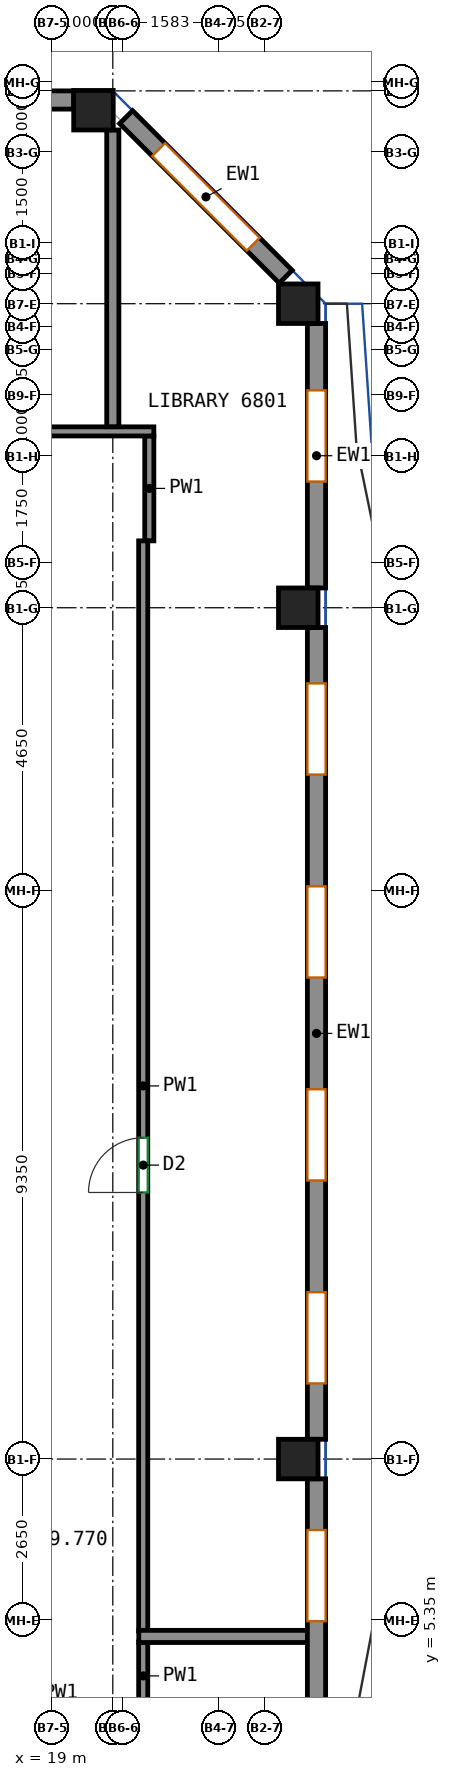
"""IFC4 building model, lengths in metres.
Left out: names, types, materials, properties, quantities, classifications, styles, units other than length and angle.
Written with IfcOpenShell. Run it as: python <this file> out.ifc"""

import sys

from ifc_helpers import new_model, si_unit, direction, frame, frame_2d, origin, origin_2d, place, context, subcontext, project, spatial, rectangle, extrude, source, transform, mapped, element, fill, save


model = new_model("IFC4")
c1 = context("Model", 3, precision=1e-05, world=origin(), true_north=direction((0.0, 1.0)))
c2 = subcontext(c1, "Body", "Model", "MODEL_VIEW")
j1 = project(units=[si_unit("LENGTHUNIT", "METRE"), si_unit("PLANEANGLEUNIT", "RADIAN")], contexts=[c1])
p1 = place(None, origin())
s1 = spatial("IfcSite", under=j1, at=p1, CompositionType="ELEMENT")
p2 = place(p1, origin())
s2 = spatial("IfcBuilding", under=s1, at=p2, CompositionType="ELEMENT")
p3 = place(p2, frame((0.0, 0.0, 277.2)))
s3 = spatial("IfcBuildingStorey", under=s2, at=p3, CompositionType="ELEMENT", Elevation=277.2)
m1 = source(origin(), c2, "Body", "SweptSolid", [
    extrude(rectangle(XDim=0.65, YDim=0.65, at=origin_2d()), origin(), (0.0, 0.0, 1.0), 3.12),
])
for number, where, z_axis, x_axis in (
    (1, (19.682, 30.182, 0.0), (0.0, 0.0, 1.0), (1.0, 0.0, 0.0)),
    (2, (23.05, 8.0, 0.0), (0.0, 0.0, 1.0), (1.0, 0.0, 0.0)),
    (3, (23.05, 22.0, 0.0), (0.0, 0.0, 1.0), (1.0, 0.0, 0.0)),
    (4, (23.05, 27.0, 0.0), (0.0, 0.0, 1.0), (1.0, 0.0, 0.0)),
):
    element("IfcColumn", number, at=place(p3, frame(where, z_axis=z_axis, x_axis=x_axis)), inside=s3, PredefinedType="COLUMN", context=c2, shape_type="MappedRepresentation", body=[
        mapped(m1, transform((0.0, 0.0, 0.0))),
    ])
m2 = source(origin(), c2, "Body", "SweptSolid", [
    extrude(rectangle(XDim=8.183, YDim=0.3, at=frame_2d((4.092, 0.0))), origin(), (0.0, 0.0, 1.0), 3.12),
])
p4 = place(p3, frame((23.35, -0.508, 0.0), z_axis=(0.0, 0.0, 1.0), x_axis=(0.0, 1.0, 0.0)))
e5 = element("IfcWall", 5, at=p4, inside=s3, PredefinedType="SOLIDWALL", context=c2, shape_type="MappedRepresentation", body=[
    mapped(m2, transform((0.0, 0.0, 0.0))),
])
p5 = place(p4, frame((1.75, 0.0, 0.8)))
e6 = element("IfcOpeningElement", 6, at=p5, cuts=e5, PredefinedType="OPENING", context=c2, shape_type="SweptSolid", body=[
    extrude(rectangle(XDim=1.5, YDim=2.05, at=frame_2d((0.75, 1.025))), frame((0.0, 0.16, 0.0), z_axis=(0.0, -1.0, 0.0), x_axis=(1.0, 0.0, 0.0)), (0.0, 0.0, 1.0), 0.32),
])
p6 = place(p4, frame((5.842, 0.0, 0.8)))
e7 = element("IfcOpeningElement", 7, at=p6, cuts=e5, PredefinedType="OPENING", context=c2, shape_type="SweptSolid", body=[
    extrude(rectangle(XDim=1.5, YDim=2.05, at=frame_2d((0.75, 1.025))), frame((0.0, 0.16, 0.0), z_axis=(0.0, -1.0, 0.0), x_axis=(1.0, 0.0, 0.0)), (0.0, 0.0, 1.0), 0.32),
])
m3 = source(origin(), c2, "Body", "SweptSolid", [
    extrude(rectangle(XDim=13.35, YDim=0.3, at=frame_2d((6.675, 0.0))), origin(), (0.0, 0.0, 1.0), 3.12),
])
p7 = place(p3, frame((23.35, 8.325, 0.0), z_axis=(0.0, 0.0, 1.0), x_axis=(0.0, 1.0, 0.0)))
e8 = element("IfcWall", 8, at=p7, inside=s3, PredefinedType="SOLIDWALL", context=c2, shape_type="MappedRepresentation", body=[
    mapped(m3, transform((0.0, 0.0, 0.0))),
])
p8 = place(p7, frame((0.919, 0.0, 0.8)))
e9 = element("IfcOpeningElement", 9, at=p8, cuts=e8, PredefinedType="OPENING", context=c2, shape_type="SweptSolid", body=[
    extrude(rectangle(XDim=1.5, YDim=2.05, at=frame_2d((0.75, 1.025))), frame((0.0, 0.16, 0.0), z_axis=(0.0, -1.0, 0.0), x_axis=(1.0, 0.0, 0.0)), (0.0, 0.0, 1.0), 0.32),
])
p9 = place(p7, frame((4.256, 0.0, 0.8)))
e10 = element("IfcOpeningElement", 10, at=p9, cuts=e8, PredefinedType="OPENING", context=c2, shape_type="SweptSolid", body=[
    extrude(rectangle(XDim=1.5, YDim=2.05, at=frame_2d((0.75, 1.025))), frame((0.0, 0.16, 0.0), z_axis=(0.0, -1.0, 0.0), x_axis=(1.0, 0.0, 0.0)), (0.0, 0.0, 1.0), 0.32),
])
p10 = place(p7, frame((7.594, 0.0, 0.8)))
e11 = element("IfcOpeningElement", 11, at=p10, cuts=e8, PredefinedType="OPENING", context=c2, shape_type="SweptSolid", body=[
    extrude(rectangle(XDim=1.5, YDim=2.05, at=frame_2d((0.75, 1.025))), frame((0.0, 0.16, 0.0), z_axis=(0.0, -1.0, 0.0), x_axis=(1.0, 0.0, 0.0)), (0.0, 0.0, 1.0), 0.32),
])
p11 = place(p7, frame((10.931, 0.0, 0.8)))
e12 = element("IfcOpeningElement", 12, at=p11, cuts=e8, PredefinedType="OPENING", context=c2, shape_type="SweptSolid", body=[
    extrude(rectangle(XDim=1.5, YDim=2.05, at=frame_2d((0.75, 1.025))), frame((0.0, 0.16, 0.0), z_axis=(0.0, -1.0, 0.0), x_axis=(1.0, 0.0, 0.0)), (0.0, 0.0, 1.0), 0.32),
])
m4 = source(origin(), c2, "Body", "SweptSolid", [
    extrude(rectangle(XDim=4.35, YDim=0.3, at=frame_2d((2.175, 0.0))), origin(), (0.0, 0.0, 1.0), 3.12),
])
p12 = place(p3, frame((23.35, 22.325, 0.0), z_axis=(0.0, 0.0, 1.0), x_axis=(0.0, 1.0, 0.0)))
e13 = element("IfcWall", 13, at=p12, inside=s3, PredefinedType="SOLIDWALL", context=c2, shape_type="MappedRepresentation", body=[
    mapped(m4, transform((0.0, 0.0, 0.0))),
])
p13 = place(p12, frame((1.75, 0.0, 0.8)))
e14 = element("IfcOpeningElement", 14, at=p13, cuts=e13, PredefinedType="OPENING", context=c2, shape_type="SweptSolid", body=[
    extrude(rectangle(XDim=1.5, YDim=2.05, at=frame_2d((0.75, 1.025))), frame((0.0, 0.16, 0.0), z_axis=(0.0, -1.0, 0.0), x_axis=(1.0, 0.0, 0.0)), (0.0, 0.0, 1.0), 0.32),
])
m5 = source(origin(), c2, "Body", "SweptSolid", [
    extrude(rectangle(XDim=3.712, YDim=0.3, at=frame_2d((1.856, 0.0))), origin(), (0.0, 0.0, 1.0), 3.12),
])
p14 = place(p3, frame((22.844, 27.444, 0.0), z_axis=(0.0, 0.0, 1.0), x_axis=(-0.707106781187, 0.707106781187, 0.0)))
e15 = element("IfcWall", 15, at=p14, inside=s3, PredefinedType="SOLIDWALL", context=c2, shape_type="MappedRepresentation", body=[
    mapped(m5, transform((0.0, 0.0, 0.0))),
])
p15 = place(p14, frame((0.756, 0.0, 0.8)))
e16 = element("IfcOpeningElement", 16, at=p15, cuts=e15, PredefinedType="OPENING", context=c2, shape_type="SweptSolid", body=[
    extrude(rectangle(XDim=2.2, YDim=2.05, at=frame_2d((1.1, 1.025))), frame((0.0, 0.16, 0.0), z_axis=(0.0, -1.0, 0.0), x_axis=(1.0, 0.0, 0.0)), (0.0, 0.0, 1.0), 0.32),
])
m6 = source(origin(), c2, "Body", "SweptSolid", [
    extrude(rectangle(XDim=6.032, YDim=0.3, at=frame_2d((3.016, 0.0))), origin(), (0.0, 0.0, 1.0), 3.12),
])
p16 = place(p3, frame((19.357, 30.35, 0.0), z_axis=(0.0, 0.0, 1.0), x_axis=(-1.0, 0.0, 0.0)))
e17 = element("IfcWall", 17, at=p16, inside=s3, PredefinedType="SOLIDWALL", context=c2, shape_type="MappedRepresentation", body=[
    mapped(m6, transform((0.0, 0.0, 0.0))),
])
p17 = place(p16, frame((0.408, 0.0, 0.8)))
e18 = element("IfcOpeningElement", 18, at=p17, cuts=e17, PredefinedType="OPENING", context=c2, shape_type="SweptSolid", body=[
    extrude(rectangle(XDim=2.2, YDim=2.05, at=frame_2d((1.1, 1.025))), frame((0.0, 0.16, 0.0), z_axis=(0.0, -1.0, 0.0), x_axis=(1.0, 0.0, 0.0)), (0.0, 0.0, 1.0), 0.32),
])
p18 = place(p16, frame((3.424, 0.0, 0.8)))
e19 = element("IfcOpeningElement", 19, at=p18, cuts=e17, PredefinedType="OPENING", context=c2, shape_type="SweptSolid", body=[
    extrude(rectangle(XDim=2.2, YDim=2.05, at=frame_2d((1.1, 1.025))), frame((0.0, 0.16, 0.0), z_axis=(0.0, -1.0, 0.0), x_axis=(1.0, 0.0, 0.0)), (0.0, 0.0, 1.0), 0.32),
])
p19 = place(p3, frame((20.5, 3.875, 0.0), z_axis=(0.0, 0.0, 1.0), x_axis=(0.0, 1.0, 0.0)))
e20 = element("IfcWall", 20, at=p19, inside=s3, PredefinedType="PARTITIONING", context=c2, shape_type="SweptSolid", body=[
    extrude(rectangle(XDim=1.118, YDim=0.15, at=frame_2d((0.559, 0.0))), origin(), (0.0, 0.0, 1.0), 3.12),
])
p20 = place(p3, frame((20.6, 23.1, 0.0), z_axis=(0.0, 0.0, 1.0), x_axis=(0.0, 1.0, 0.0)))
e21 = element("IfcWall", 21, at=p20, inside=s3, PredefinedType="PARTITIONING", context=c2, shape_type="SweptSolid", body=[
    extrude(rectangle(XDim=1.725, YDim=0.15, at=frame_2d((0.862, 0.0))), origin(), (0.0, 0.0, 1.0), 3.12),
])
p21 = place(p3, frame((20.5, 5.173, 0.0), z_axis=(0.0, 0.0, 1.0), x_axis=(0.0, 1.0, 0.0)))
e22 = element("IfcWall", 22, at=p21, inside=s3, PredefinedType="PARTITIONING", context=c2, shape_type="SweptSolid", body=[
    extrude(rectangle(XDim=17.927, YDim=0.15, at=frame_2d((8.963, 0.0))), origin(), (0.0, 0.0, 1.0), 3.12),
])
p22 = place(p21, frame((7.211, 0.0, 0.0)))
e23 = element("IfcOpeningElement", 23, at=p22, cuts=e22, PredefinedType="OPENING", context=c2, shape_type="SweptSolid", body=[
    extrude(rectangle(XDim=0.9, YDim=2.1, at=frame_2d((0.45, 1.05))), frame((0.0, 0.085, 0.0), z_axis=(0.0, -1.0, 0.0), x_axis=(1.0, 0.0, 0.0)), (0.0, 0.0, 1.0), 0.17),
])
p23 = place(p3, frame((-19.075, 24.9, 0.0), z_axis=(0.0, 0.0, 1.0), x_axis=(1.0, 0.0, 0.0)))
e24 = element("IfcWall", 24, at=p23, inside=s3, PredefinedType="PARTITIONING", context=c2, shape_type="SweptSolid", body=[
    extrude(rectangle(XDim=39.75, YDim=0.15, at=frame_2d((19.875, 0.0))), origin(), (0.0, 0.0, 1.0), 3.12),
])
p24 = place(p23, frame((11.365, 0.0, 0.0)))
e25 = element("IfcOpeningElement", 25, at=p24, cuts=e24, PredefinedType="OPENING", context=c2, shape_type="SweptSolid", body=[
    extrude(rectangle(XDim=1.0, YDim=2.1, at=frame_2d((0.5, 1.05))), frame((0.0, 0.085, 0.0), z_axis=(0.0, -1.0, 0.0), x_axis=(1.0, 0.0, 0.0)), (0.0, 0.0, 1.0), 0.17),
])
p25 = place(p23, frame((33.379, 0.0, 0.0)))
e26 = element("IfcOpeningElement", 26, at=p25, cuts=e24, PredefinedType="OPENING", context=c2, shape_type="SweptSolid", body=[
    extrude(rectangle(XDim=0.9, YDim=2.1, at=frame_2d((0.45, 1.05))), frame((0.0, 0.085, 0.0), z_axis=(0.0, -1.0, 0.0), x_axis=(1.0, 0.0, 0.0)), (0.0, 0.0, 1.0), 0.17),
])
p26 = place(p3, frame((23.25, 5.083, 0.0), z_axis=(0.0, 0.0, 1.0), x_axis=(-1.0, 0.0, 0.0)))
e27 = element("IfcWall", 27, at=p26, inside=s3, PredefinedType="PARTITIONING", context=c2, shape_type="SweptSolid", body=[
    extrude(rectangle(XDim=2.823, YDim=0.2, at=frame_2d((1.412, 0.0))), origin(), (0.0, 0.0, 1.0), 3.12),
])
p27 = place(p3, frame((20.0, 29.857, 0.0), z_axis=(0.0, 0.0, 1.0), x_axis=(0.0, -1.0, 0.0)))
e28 = element("IfcWall", 28, at=p27, inside=s3, PredefinedType="PARTITIONING", context=c2, shape_type="SweptSolid", body=[
    extrude(rectangle(XDim=4.88, YDim=0.2, at=frame_2d((2.44, 0.0))), origin(), (0.0, 0.0, 1.0), 3.12),
])
p28 = place(p6, origin())
e29 = element("IfcWindow", 29, at=p28, inside=s3, PartitioningType="SINGLE_PANEL", PredefinedType="WINDOW", context=c2, shape_type="SweptSolid", body=[
    extrude(rectangle(XDim=1.5, YDim=2.05, at=frame_2d((0.75, 1.025))), frame((0.0, 0.03, 0.0), z_axis=(0.0, -1.0, 0.0), x_axis=(1.0, 0.0, 0.0)), (0.0, 0.0, 1.0), 0.06),
])
fill(e7, e29)
p29 = place(p8, origin())
e30 = element("IfcWindow", 30, at=p29, inside=s3, PartitioningType="SINGLE_PANEL", PredefinedType="WINDOW", context=c2, shape_type="SweptSolid", body=[
    extrude(rectangle(XDim=1.5, YDim=2.05, at=frame_2d((0.75, 1.025))), frame((0.0, 0.03, 0.0), z_axis=(0.0, -1.0, 0.0), x_axis=(1.0, 0.0, 0.0)), (0.0, 0.0, 1.0), 0.06),
])
fill(e9, e30)
p30 = place(p9, origin())
e31 = element("IfcWindow", 31, at=p30, inside=s3, PartitioningType="SINGLE_PANEL", PredefinedType="WINDOW", context=c2, shape_type="SweptSolid", body=[
    extrude(rectangle(XDim=1.5, YDim=2.05, at=frame_2d((0.75, 1.025))), frame((0.0, 0.03, 0.0), z_axis=(0.0, -1.0, 0.0), x_axis=(1.0, 0.0, 0.0)), (0.0, 0.0, 1.0), 0.06),
])
fill(e10, e31)
p31 = place(p10, origin())
e32 = element("IfcWindow", 32, at=p31, inside=s3, PartitioningType="SINGLE_PANEL", PredefinedType="WINDOW", context=c2, shape_type="SweptSolid", body=[
    extrude(rectangle(XDim=1.5, YDim=2.05, at=frame_2d((0.75, 1.025))), frame((0.0, 0.03, 0.0), z_axis=(0.0, -1.0, 0.0), x_axis=(1.0, 0.0, 0.0)), (0.0, 0.0, 1.0), 0.06),
])
fill(e11, e32)
p32 = place(p11, origin())
e33 = element("IfcWindow", 33, at=p32, inside=s3, PartitioningType="SINGLE_PANEL", PredefinedType="WINDOW", context=c2, shape_type="SweptSolid", body=[
    extrude(rectangle(XDim=1.5, YDim=2.05, at=frame_2d((0.75, 1.025))), frame((0.0, 0.03, 0.0), z_axis=(0.0, -1.0, 0.0), x_axis=(1.0, 0.0, 0.0)), (0.0, 0.0, 1.0), 0.06),
])
fill(e12, e33)
p33 = place(p13, origin())
e34 = element("IfcWindow", 34, at=p33, inside=s3, PartitioningType="SINGLE_PANEL", PredefinedType="WINDOW", context=c2, shape_type="SweptSolid", body=[
    extrude(rectangle(XDim=1.5, YDim=2.05, at=frame_2d((0.75, 1.025))), frame((0.0, 0.03, 0.0), z_axis=(0.0, -1.0, 0.0), x_axis=(1.0, 0.0, 0.0)), (0.0, 0.0, 1.0), 0.06),
])
fill(e14, e34)
p34 = place(p15, origin())
e35 = element("IfcWindow", 35, at=p34, inside=s3, PartitioningType="SINGLE_PANEL", PredefinedType="WINDOW", context=c2, shape_type="SweptSolid", body=[
    extrude(rectangle(XDim=2.2, YDim=2.05, at=frame_2d((1.1, 1.025))), frame((0.0, 0.03, 0.0), z_axis=(0.0, -1.0, 0.0), x_axis=(1.0, 0.0, 0.0)), (0.0, 0.0, 1.0), 0.06),
])
fill(e16, e35)
p35 = place(p22, origin())
e36 = element("IfcDoor", 36, at=p35, inside=s3, OperationType="SINGLE_SWING_LEFT", PredefinedType="DOOR", context=c2, shape_type="SweptSolid", body=[
    extrude(rectangle(XDim=0.9, YDim=2.1, at=frame_2d((0.45, 1.05))), frame((0.0, 0.025, 0.0), z_axis=(0.0, -1.0, 0.0), x_axis=(1.0, 0.0, 0.0)), (0.0, 0.0, 1.0), 0.05),
])
fill(e23, e36)
save(model, sys.argv[1])
